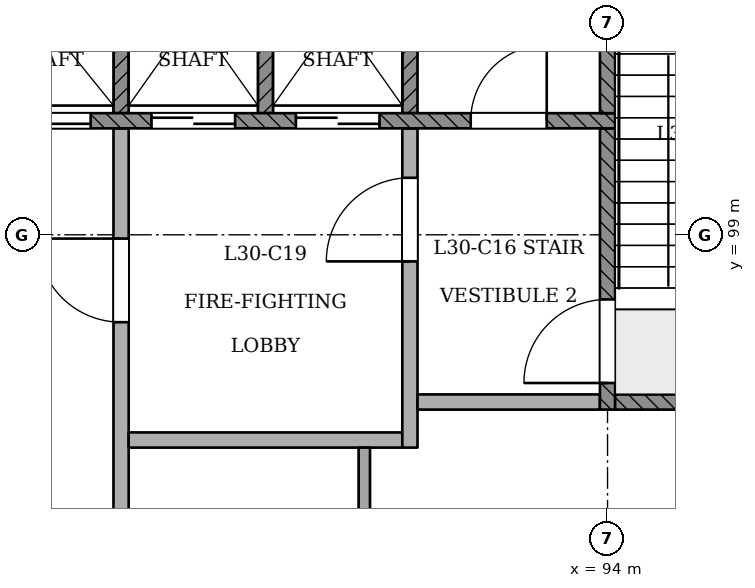
"""IFC4 building model, lengths in metres.
Left out: names, types, materials, properties, quantities, classifications, styles, units other than length and angle.
Written with IfcOpenShell. Run it as: python <this file> out.ifc"""

import sys

from ifc_helpers import new_model, si_unit, direction, frame, frame_2d, origin, place, context, subcontext, project, spatial, rectangle, extrude, element, fill, save


model = new_model("IFC4")
c1 = context("Model", 3, precision=1e-05, world=origin(), true_north=direction((0.0, 1.0)))
c2 = subcontext(c1, "Body", "Model", "MODEL_VIEW")
j1 = project(units=[si_unit("LENGTHUNIT", "METRE"), si_unit("PLANEANGLEUNIT", "RADIAN")], contexts=[c1])
p1 = place(None, origin())
s1 = spatial("IfcSite", under=j1, at=p1, CompositionType="ELEMENT")
p2 = place(p1, origin())
s2 = spatial("IfcBuilding", under=s1, at=p2, CompositionType="ELEMENT")
p3 = place(p2, frame((0.0, 0.0, 118.8)))
s3 = spatial("IfcBuildingStorey", under=s2, at=p3, CompositionType="ELEMENT", Elevation=118.8)
p4 = place(p3, frame((85.266, 62.526, 0.0), z_axis=(0.0, 0.0, 1.0), x_axis=(0.500002121612, 0.866024178868, 0.0)))
e1 = element("IfcWall", 1, at=p4, inside=s3, PredefinedType="PARTITIONING", context=c2, shape_type="SweptSolid", body=[
    extrude(rectangle(XDim=41.007, YDim=0.15, at=frame_2d((20.503, 0.0))), origin(), (0.0, 0.0, 1.0), 4.55),
])
p5 = place(p4, frame((0.227, 0.0, 0.0)))
e2 = element("IfcOpeningElement", 2, at=p5, cuts=e1, PredefinedType="OPENING", context=c2, shape_type="SweptSolid", body=[
    extrude(rectangle(XDim=1.2, YDim=2.1, at=frame_2d((0.6, 1.05))), frame((0.0, 0.085, 0.0), z_axis=(0.0, -1.0, 0.0), x_axis=(1.0, 0.0, 0.0)), (0.0, 0.0, 1.0), 0.171),
])
p6 = place(p4, frame((5.304, 0.0, 0.0)))
e3 = element("IfcOpeningElement", 3, at=p6, cuts=e1, PredefinedType="OPENING", context=c2, shape_type="SweptSolid", body=[
    extrude(rectangle(XDim=1.2, YDim=2.1, at=frame_2d((0.6, 1.05))), frame((0.0, 0.085, 0.0), z_axis=(0.0, -1.0, 0.0), x_axis=(1.0, 0.0, 0.0)), (0.0, 0.0, 1.0), 0.171),
])
p7 = place(p4, frame((14.304, 0.0, 0.0)))
e4 = element("IfcOpeningElement", 4, at=p7, cuts=e1, PredefinedType="OPENING", context=c2, shape_type="SweptSolid", body=[
    extrude(rectangle(XDim=1.2, YDim=2.1, at=frame_2d((0.6, 1.05))), frame((0.0, 0.085, 0.0), z_axis=(0.0, -1.0, 0.0), x_axis=(1.0, 0.0, 0.0)), (0.0, 0.0, 1.0), 0.171),
])
p8 = place(p4, frame((26.654, 0.0, 0.0)))
e5 = element("IfcOpeningElement", 5, at=p8, cuts=e1, PredefinedType="OPENING", context=c2, shape_type="SweptSolid", body=[
    extrude(rectangle(XDim=1.2, YDim=2.1, at=frame_2d((0.6, 1.05))), frame((0.0, 0.085, 0.0), z_axis=(0.0, -1.0, 0.0), x_axis=(1.0, 0.0, 0.0)), (0.0, 0.0, 1.0), 0.171),
])
p9 = place(p4, frame((39.549, 0.0, 0.0)))
e6 = element("IfcOpeningElement", 6, at=p9, cuts=e1, PredefinedType="OPENING", context=c2, shape_type="SweptSolid", body=[
    extrude(rectangle(XDim=1.2, YDim=2.1, at=frame_2d((0.6, 1.05))), frame((0.0, 0.085, 0.0), z_axis=(0.0, -1.0, 0.0), x_axis=(1.0, 0.0, 0.0)), (0.0, 0.0, 1.0), 0.171),
])
p10 = place(p3, frame((87.6, 93.4, 0.0), z_axis=(0.0, 0.0, 1.0), x_axis=(0.0, 1.0, 0.0)))
e7 = element("IfcWall", 7, at=p10, inside=s3, PredefinedType="PARTITIONING", context=c2, shape_type="SweptSolid", body=[
    extrude(rectangle(XDim=7.0, YDim=0.2, at=frame_2d((3.5, 0.0))), origin(), (0.0, 0.0, 1.0), 4.95),
])
p11 = place(p10, frame((4.45, 0.0, 0.0)))
e8 = element("IfcOpeningElement", 8, at=p11, cuts=e7, PredefinedType="OPENING", context=c2, shape_type="SweptSolid", body=[
    extrude(rectangle(XDim=1.1, YDim=2.1, at=frame_2d((0.55, 1.05))), frame((0.0, 0.11, 0.0), z_axis=(0.0, -1.0, 0.0), x_axis=(1.0, 0.0, 0.0)), (0.0, 0.0, 1.0), 0.221),
])
p12 = place(p3, frame((90.8, 93.4, 0.0), z_axis=(0.0, 0.0, 1.0), x_axis=(0.0, 1.0, 0.0)))
e9 = element("IfcWall", 9, at=p12, inside=s3, PredefinedType="PARTITIONING", context=c2, shape_type="SweptSolid", body=[
    extrude(rectangle(XDim=2.8, YDim=0.15, at=frame_2d((1.4, 0.0))), origin(), (0.0, 0.0, 1.0), 4.95),
])
p13 = place(p3, frame((87.7, 96.3, 0.0), z_axis=(0.0, 0.0, 1.0), x_axis=(1.0, 0.0, 0.0)))
e10 = element("IfcWall", 10, at=p13, inside=s3, PredefinedType="PARTITIONING", context=c2, shape_type="SweptSolid", body=[
    extrude(rectangle(XDim=3.6, YDim=0.2, at=frame_2d((1.8, 0.0))), origin(), (0.0, 0.0, 1.0), 4.95),
])
p14 = place(p3, frame((91.4, 96.2, 0.0), z_axis=(0.0, 0.0, 1.0), x_axis=(0.0, 1.0, 0.0)))
e11 = element("IfcWall", 11, at=p14, inside=s3, PredefinedType="PARTITIONING", context=c2, shape_type="SweptSolid", body=[
    extrude(rectangle(XDim=4.2, YDim=0.2, at=frame_2d((2.1, 0.0))), origin(), (0.0, 0.0, 1.0), 4.95),
])
p15 = place(p14, frame((2.45, 0.0, 0.0)))
e12 = element("IfcOpeningElement", 12, at=p15, cuts=e11, PredefinedType="OPENING", context=c2, shape_type="SweptSolid", body=[
    extrude(rectangle(XDim=1.1, YDim=2.1, at=frame_2d((0.55, 1.05))), frame((0.0, 0.11, 0.0), z_axis=(0.0, -1.0, 0.0), x_axis=(1.0, 0.0, 0.0)), (0.0, 0.0, 1.0), 0.221),
])
p16 = place(p3, frame((91.5, 96.8, 0.0), z_axis=(0.0, 0.0, 1.0), x_axis=(1.0, 0.0, 0.0)))
e13 = element("IfcWall", 13, at=p16, inside=s3, PredefinedType="PARTITIONING", context=c2, shape_type="SweptSolid", body=[
    extrude(rectangle(XDim=2.4, YDim=0.2, at=frame_2d((1.2, 0.0))), origin(), (0.0, 0.0, 1.0), 4.95),
])
p17 = place(p3, frame((94.0, 96.7, 0.0), z_axis=(0.0, 0.0, 1.0), x_axis=(0.0, 1.0, 0.0)))
e14 = element("IfcWall", 14, at=p17, inside=s3, PredefinedType="SOLIDWALL", context=c2, shape_type="SweptSolid", body=[
    extrude(rectangle(XDim=3.7, YDim=0.2, at=frame_2d((1.85, 0.0))), origin(), (0.0, 0.0, 1.0), 4.95),
])
p18 = place(p17, frame((0.35, 0.0, 0.0)))
e15 = element("IfcOpeningElement", 15, at=p18, cuts=e14, PredefinedType="OPENING", context=c2, shape_type="SweptSolid", body=[
    extrude(rectangle(XDim=1.1, YDim=2.1, at=frame_2d((0.55, 1.05))), frame((0.0, 0.11, 0.0), z_axis=(0.0, -1.0, 0.0), x_axis=(1.0, 0.0, 0.0)), (0.0, 0.0, 1.0), 0.221),
])
p19 = place(p3, frame((94.1, 96.8, 0.0), z_axis=(0.0, 0.0, 1.0), x_axis=(1.0, 0.0, 0.0)))
e16 = element("IfcWall", 16, at=p19, inside=s3, PredefinedType="SOLIDWALL", context=c2, shape_type="SweptSolid", body=[
    extrude(rectangle(XDim=2.9, YDim=0.2, at=frame_2d((1.45, 0.0))), origin(), (0.0, 0.0, 1.0), 4.95),
])
p20 = place(p3, frame((75.9, 100.5, 0.0), z_axis=(0.0, 0.0, 1.0), x_axis=(1.0, 0.0, 0.0)))
e17 = element("IfcWall", 17, at=p20, inside=s3, PredefinedType="SOLIDWALL", context=c2, shape_type="SweptSolid", body=[
    extrude(rectangle(XDim=18.2, YDim=0.2, at=frame_2d((9.1, 0.0))), origin(), (0.0, 0.0, 1.0), 4.95),
])
p21 = place(p20, frame((2.6, 0.0, 0.0)))
e18 = element("IfcOpeningElement", 18, at=p21, cuts=e17, PredefinedType="OPENING", context=c2, shape_type="SweptSolid", body=[
    extrude(rectangle(XDim=1.1, YDim=2.1, at=frame_2d((0.55, 1.05))), frame((0.0, 0.11, 0.0), z_axis=(0.0, -1.0, 0.0), x_axis=(1.0, 0.0, 0.0)), (0.0, 0.0, 1.0), 0.221),
])
p22 = place(p20, frame((4.5, 0.0, 0.0)))
e19 = element("IfcOpeningElement", 19, at=p22, cuts=e17, PredefinedType="OPENING", context=c2, shape_type="SweptSolid", body=[
    extrude(rectangle(XDim=1.1, YDim=2.1, at=frame_2d((0.55, 1.05))), frame((0.0, 0.11, 0.0), z_axis=(0.0, -1.0, 0.0), x_axis=(1.0, 0.0, 0.0)), (0.0, 0.0, 1.0), 0.221),
])
p23 = place(p20, frame((6.4, 0.0, 0.0)))
e20 = element("IfcOpeningElement", 20, at=p23, cuts=e17, PredefinedType="OPENING", context=c2, shape_type="SweptSolid", body=[
    extrude(rectangle(XDim=1.1, YDim=2.1, at=frame_2d((0.55, 1.05))), frame((0.0, 0.11, 0.0), z_axis=(0.0, -1.0, 0.0), x_axis=(1.0, 0.0, 0.0)), (0.0, 0.0, 1.0), 0.221),
])
p24 = place(p20, frame((8.3, 0.0, 0.0)))
e21 = element("IfcOpeningElement", 21, at=p24, cuts=e17, PredefinedType="OPENING", context=c2, shape_type="SweptSolid", body=[
    extrude(rectangle(XDim=1.1, YDim=2.1, at=frame_2d((0.55, 1.05))), frame((0.0, 0.11, 0.0), z_axis=(0.0, -1.0, 0.0), x_axis=(1.0, 0.0, 0.0)), (0.0, 0.0, 1.0), 0.221),
])
p25 = place(p20, frame((10.2, 0.0, 0.0)))
e22 = element("IfcOpeningElement", 22, at=p25, cuts=e17, PredefinedType="OPENING", context=c2, shape_type="SweptSolid", body=[
    extrude(rectangle(XDim=1.1, YDim=2.1, at=frame_2d((0.55, 1.05))), frame((0.0, 0.11, 0.0), z_axis=(0.0, -1.0, 0.0), x_axis=(1.0, 0.0, 0.0)), (0.0, 0.0, 1.0), 0.221),
])
p26 = place(p20, frame((12.1, 0.0, 0.0)))
e23 = element("IfcOpeningElement", 23, at=p26, cuts=e17, PredefinedType="OPENING", context=c2, shape_type="SweptSolid", body=[
    extrude(rectangle(XDim=1.1, YDim=2.1, at=frame_2d((0.55, 1.05))), frame((0.0, 0.11, 0.0), z_axis=(0.0, -1.0, 0.0), x_axis=(1.0, 0.0, 0.0)), (0.0, 0.0, 1.0), 0.221),
])
p27 = place(p20, frame((14.0, 0.0, 0.0)))
e24 = element("IfcOpeningElement", 24, at=p27, cuts=e17, PredefinedType="OPENING", context=c2, shape_type="SweptSolid", body=[
    extrude(rectangle(XDim=1.1, YDim=2.1, at=frame_2d((0.55, 1.05))), frame((0.0, 0.11, 0.0), z_axis=(0.0, -1.0, 0.0), x_axis=(1.0, 0.0, 0.0)), (0.0, 0.0, 1.0), 0.221),
])
p28 = place(p20, frame((0.65, 0.0, 0.0)))
e25 = element("IfcOpeningElement", 25, at=p28, cuts=e17, PredefinedType="OPENING", context=c2, shape_type="SweptSolid", body=[
    extrude(rectangle(XDim=1.0, YDim=2.1, at=frame_2d((0.5, 1.05))), frame((0.0, 0.11, 0.0), z_axis=(0.0, -1.0, 0.0), x_axis=(1.0, 0.0, 0.0)), (0.0, 0.0, 1.0), 0.221),
])
p29 = place(p20, frame((16.3, 0.0, 0.0)))
e26 = element("IfcOpeningElement", 26, at=p29, cuts=e17, PredefinedType="OPENING", context=c2, shape_type="SweptSolid", body=[
    extrude(rectangle(XDim=1.0, YDim=2.1, at=frame_2d((0.5, 1.05))), frame((0.0, 0.11, 0.0), z_axis=(0.0, -1.0, 0.0), x_axis=(1.0, 0.0, 0.0)), (0.0, 0.0, 1.0), 0.221),
])
for number, where, z_axis, x_axis in (
    (27, (87.6, 100.6, 0.0), (0.0, 0.0, 1.0), (0.0, 1.0, 0.0)),
    (28, (89.5, 100.6, 0.0), (0.0, 0.0, 1.0), (0.0, 1.0, 0.0)),
    (29, (91.4, 100.6, 0.0), (0.0, 0.0, 1.0), (0.0, 1.0, 0.0)),
    (30, (94.0, 100.6, 0.0), (0.0, 0.0, 1.0), (0.0, 1.0, 0.0)),
):
    element("IfcWall", number, at=place(p3, frame(where, z_axis=z_axis, x_axis=x_axis)), inside=s3, PredefinedType="SOLIDWALL", context=c2, shape_type="SweptSolid", body=[
        extrude(rectangle(XDim=2.8, YDim=0.2, at=frame_2d((1.4, 0.0))), origin(), (0.0, 0.0, 1.0), 4.95),
    ])
p30 = place(p25, origin())
e31 = element("IfcDoor", 31, at=p30, inside=s3, OperationType="SLIDING_TO_RIGHT", PredefinedType="NOTDEFINED", context=c2, shape_type="SweptSolid", body=[
    extrude(rectangle(XDim=1.1, YDim=2.1, at=frame_2d((0.55, 1.05))), frame((0.0, 0.025, 0.0), z_axis=(0.0, -1.0, 0.0), x_axis=(1.0, 0.0, 0.0)), (0.0, 0.0, 1.0), 0.05),
])
fill(e22, e31)
p31 = place(p26, origin())
e32 = element("IfcDoor", 32, at=p31, inside=s3, OperationType="SLIDING_TO_RIGHT", PredefinedType="NOTDEFINED", context=c2, shape_type="SweptSolid", body=[
    extrude(rectangle(XDim=1.1, YDim=2.1, at=frame_2d((0.55, 1.05))), frame((0.0, 0.025, 0.0), z_axis=(0.0, -1.0, 0.0), x_axis=(1.0, 0.0, 0.0)), (0.0, 0.0, 1.0), 0.05),
])
fill(e23, e32)
p32 = place(p27, origin())
e33 = element("IfcDoor", 33, at=p32, inside=s3, OperationType="SLIDING_TO_LEFT", PredefinedType="NOTDEFINED", context=c2, shape_type="SweptSolid", body=[
    extrude(rectangle(XDim=1.1, YDim=2.1, at=frame_2d((0.55, 1.05))), frame((0.0, 0.025, 0.0), z_axis=(0.0, -1.0, 0.0), x_axis=(1.0, 0.0, 0.0)), (0.0, 0.0, 1.0), 0.05),
])
fill(e24, e33)
p33 = place(p18, origin())
e34 = element("IfcDoor", 34, at=p33, inside=s3, OperationType="SINGLE_SWING_LEFT", PredefinedType="NOTDEFINED", context=c2, shape_type="SweptSolid", body=[
    extrude(rectangle(XDim=1.1, YDim=2.1, at=frame_2d((0.55, 1.05))), frame((0.0, 0.025, 0.0), z_axis=(0.0, -1.0, 0.0), x_axis=(1.0, 0.0, 0.0)), (0.0, 0.0, 1.0), 0.05),
])
fill(e15, e34)
p34 = place(p11, origin())
e35 = element("IfcDoor", 35, at=p34, inside=s3, OperationType="SINGLE_SWING_RIGHT", PredefinedType="NOTDEFINED", context=c2, shape_type="SweptSolid", body=[
    extrude(rectangle(XDim=1.1, YDim=2.1, at=frame_2d((0.55, 1.05))), frame((0.0, 0.025, 0.0), z_axis=(0.0, -1.0, 0.0), x_axis=(1.0, 0.0, 0.0)), (0.0, 0.0, 1.0), 0.05),
])
fill(e8, e35)
p35 = place(p15, origin())
e36 = element("IfcDoor", 36, at=p35, inside=s3, OperationType="SINGLE_SWING_LEFT", PredefinedType="NOTDEFINED", context=c2, shape_type="SweptSolid", body=[
    extrude(rectangle(XDim=1.1, YDim=2.1, at=frame_2d((0.55, 1.05))), frame((0.0, 0.025, 0.0), z_axis=(0.0, -1.0, 0.0), x_axis=(1.0, 0.0, 0.0)), (0.0, 0.0, 1.0), 0.05),
])
fill(e12, e36)
p36 = place(p29, origin())
e37 = element("IfcDoor", 37, at=p36, inside=s3, OperationType="SINGLE_SWING_RIGHT", PredefinedType="NOTDEFINED", context=c2, shape_type="SweptSolid", body=[
    extrude(rectangle(XDim=1.0, YDim=2.1, at=frame_2d((0.5, 1.05))), frame((0.0, 0.025, 0.0), z_axis=(0.0, -1.0, 0.0), x_axis=(1.0, 0.0, 0.0)), (0.0, 0.0, 1.0), 0.05),
])
fill(e26, e37)
save(model, sys.argv[1])
